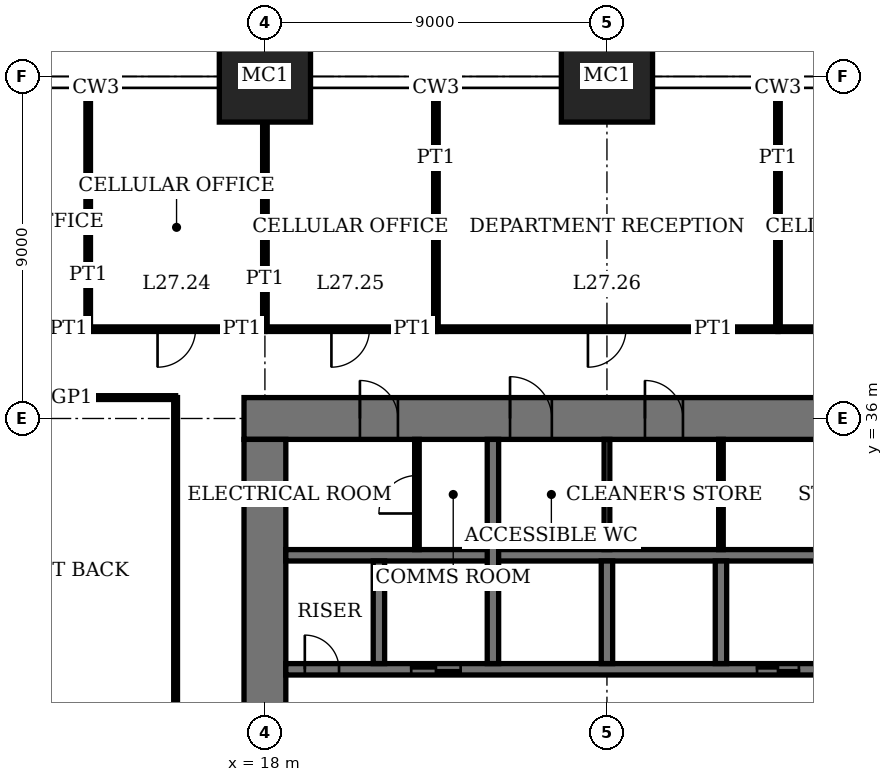
"""IFC4 building model, lengths in metres.
Left out: names, types, materials, properties, quantities, classifications, styles, units other than length and angle.
Written with IfcOpenShell. Run it as: python <this file> out.ifc"""

import sys

from ifc_helpers import new_model, si_unit, direction, frame, frame_2d, origin, origin_2d, place, context, subcontext, project, spatial, rectangle, extrude, element, fill, save


model = new_model("IFC4")
c1 = context("Model", 3, precision=1e-05, world=origin(), true_north=direction((0.0, 1.0)))
c2 = subcontext(c1, "Body", "Model", "MODEL_VIEW")
j1 = project(units=[si_unit("LENGTHUNIT", "METRE"), si_unit("PLANEANGLEUNIT", "RADIAN")], contexts=[c1])
p1 = place(None, origin())
s1 = spatial("IfcSite", under=j1, at=p1, CompositionType="ELEMENT")
p2 = place(p1, origin())
s2 = spatial("IfcBuilding", under=s1, at=p2, CompositionType="ELEMENT")
p3 = place(p2, frame((0.0, 0.0, 113.0)))
s3 = spatial("IfcBuildingStorey", under=s2, at=p3, CompositionType="ELEMENT", Elevation=113.0)
for number, where, z_axis, x_axis in (
    (1, (18.0, 45.0, 0.0), (0.0, 0.0, 1.0), (1.0, 0.0, 0.0)),
    (2, (27.0, 45.0, 0.0), (0.0, 0.0, 1.0), (1.0, 0.0, 0.0)),
):
    element("IfcColumn", number, at=place(p3, frame(where, z_axis=z_axis, x_axis=x_axis)), inside=s3, PredefinedType="COLUMN", context=c2, shape_type="SweptSolid", body=[
        extrude(rectangle(XDim=2.4, YDim=2.4, at=origin_2d()), origin(), (0.0, 0.0, 1.0), 4.0),
    ])
p4 = place(p3, frame((45.55, 36.0, 0.0), z_axis=(0.0, 0.0, 1.0), x_axis=(-1.0, 0.0, 0.0)))
e3 = element("IfcWall", 3, at=p4, inside=s3, PredefinedType="SHEAR", context=c2, shape_type="SweptSolid", body=[
    extrude(rectangle(XDim=28.1, YDim=1.1, at=frame_2d((14.05, 0.0))), origin(), (0.0, 0.0, 1.0), 4.0),
])
p5 = place(p4, frame((11.55, 0.0, 0.0)))
e4 = element("IfcOpeningElement", 4, at=p5, cuts=e3, PredefinedType="OPENING", context=c2, shape_type="SweptSolid", body=[
    extrude(rectangle(XDim=1.0, YDim=2.4, at=frame_2d((0.5, 1.2))), frame((0.0, 0.56, 0.0), z_axis=(0.0, -1.0, 0.0), x_axis=(1.0, 0.0, 0.0)), (0.0, 0.0, 1.0), 1.12),
])
p6 = place(p4, frame((16.55, 0.0, 0.0)))
e5 = element("IfcOpeningElement", 5, at=p6, cuts=e3, PredefinedType="OPENING", context=c2, shape_type="SweptSolid", body=[
    extrude(rectangle(XDim=1.0, YDim=2.4, at=frame_2d((0.5, 1.2))), frame((0.0, 0.56, 0.0), z_axis=(0.0, -1.0, 0.0), x_axis=(1.0, 0.0, 0.0)), (0.0, 0.0, 1.0), 1.12),
])
p7 = place(p4, frame((20.0, 0.0, 0.0)))
e6 = element("IfcOpeningElement", 6, at=p7, cuts=e3, PredefinedType="OPENING", context=c2, shape_type="SweptSolid", body=[
    extrude(rectangle(XDim=1.1, YDim=2.4, at=frame_2d((0.55, 1.2))), frame((0.0, 0.56, 0.0), z_axis=(0.0, -1.0, 0.0), x_axis=(1.0, 0.0, 0.0)), (0.0, 0.0, 1.0), 1.12),
])
p8 = place(p4, frame((24.05, 0.0, 0.0)))
e7 = element("IfcOpeningElement", 7, at=p8, cuts=e3, PredefinedType="OPENING", context=c2, shape_type="SweptSolid", body=[
    extrude(rectangle(XDim=1.0, YDim=2.4, at=frame_2d((0.5, 1.2))), frame((0.0, 0.56, 0.0), z_axis=(0.0, -1.0, 0.0), x_axis=(1.0, 0.0, 0.0)), (0.0, 0.0, 1.0), 1.12),
])
p9 = place(p3, frame((18.0, 35.45, 0.0), z_axis=(0.0, 0.0, 1.0), x_axis=(0.0, -1.0, 0.0)))
e8 = element("IfcWall", 8, at=p9, inside=s3, PredefinedType="SHEAR", context=c2, shape_type="SweptSolid", body=[
    extrude(rectangle(XDim=16.9, YDim=1.1, at=frame_2d((8.45, 0.0))), origin(), (0.0, 0.0, 1.0), 4.0),
])
p10 = place(p9, frame((8.45, 0.0, 0.0)))
e9 = element("IfcOpeningElement", 9, at=p10, cuts=e8, PredefinedType="OPENING", context=c2, shape_type="SweptSolid", body=[
    extrude(rectangle(XDim=1.8, YDim=2.4, at=frame_2d((0.9, 1.2))), frame((0.0, 0.56, 0.0), z_axis=(0.0, -1.0, 0.0), x_axis=(1.0, 0.0, 0.0)), (0.0, 0.0, 1.0), 1.12),
])
p11 = place(p3, frame((18.55, 29.4, 0.0), z_axis=(0.0, 0.0, 1.0), x_axis=(1.0, 0.0, 0.0)))
e10 = element("IfcWall", 10, at=p11, inside=s3, PredefinedType="SHEAR", context=c2, shape_type="SweptSolid", body=[
    extrude(rectangle(XDim=25.9, YDim=0.3, at=frame_2d((12.95, 0.0))), origin(), (0.0, 0.0, 1.0), 4.0),
])
p12 = place(p11, frame((19.95, 0.0, 0.0)))
e11 = element("IfcOpeningElement", 11, at=p12, cuts=e10, PredefinedType="OPENING", context=c2, shape_type="SweptSolid", body=[
    extrude(rectangle(XDim=1.0, YDim=2.4, at=frame_2d((0.5, 1.2))), frame((0.0, 0.16, 0.0), z_axis=(0.0, -1.0, 0.0), x_axis=(1.0, 0.0, 0.0)), (0.0, 0.0, 1.0), 0.32),
])
p13 = place(p11, frame((0.5, 0.0, 0.0)))
e12 = element("IfcOpeningElement", 12, at=p13, cuts=e10, PredefinedType="OPENING", context=c2, shape_type="SweptSolid", body=[
    extrude(rectangle(XDim=0.9, YDim=2.1, at=frame_2d((0.45, 1.05))), frame((0.0, 0.16, 0.0), z_axis=(0.0, -1.0, 0.0), x_axis=(1.0, 0.0, 0.0)), (0.0, 0.0, 1.0), 0.32),
])
p14 = place(p11, frame((15.4, 0.0, 0.0)))
e13 = element("IfcOpeningElement", 13, at=p14, cuts=e10, PredefinedType="OPENING", context=c2, shape_type="SweptSolid", body=[
    extrude(rectangle(XDim=1.1, YDim=2.4, at=frame_2d((0.55, 1.2))), frame((0.0, 0.16, 0.0), z_axis=(0.0, -1.0, 0.0), x_axis=(1.0, 0.0, 0.0)), (0.0, 0.0, 1.0), 0.32),
])
p15 = place(p11, frame((12.4, 0.0, 0.0)))
e14 = element("IfcOpeningElement", 14, at=p15, cuts=e10, PredefinedType="OPENING", context=c2, shape_type="SweptSolid", body=[
    extrude(rectangle(XDim=1.1, YDim=2.4, at=frame_2d((0.55, 1.2))), frame((0.0, 0.16, 0.0), z_axis=(0.0, -1.0, 0.0), x_axis=(1.0, 0.0, 0.0)), (0.0, 0.0, 1.0), 0.32),
])
p16 = place(p11, frame((3.3, 0.0, 0.0)))
e15 = element("IfcOpeningElement", 15, at=p16, cuts=e10, PredefinedType="OPENING", context=c2, shape_type="SweptSolid", body=[
    extrude(rectangle(XDim=1.3, YDim=2.4, at=frame_2d((0.65, 1.2))), frame((0.0, 0.16, 0.0), z_axis=(0.0, -1.0, 0.0), x_axis=(1.0, 0.0, 0.0)), (0.0, 0.0, 1.0), 0.32),
])
p17 = place(p3, frame((18.55, 32.4, 0.0), z_axis=(0.0, 0.0, 1.0), x_axis=(1.0, 0.0, 0.0)))
e16 = element("IfcWall", 16, at=p17, inside=s3, PredefinedType="SHEAR", context=c2, shape_type="SweptSolid", body=[
    extrude(rectangle(XDim=17.3, YDim=0.3, at=frame_2d((8.65, 0.0))), origin(), (0.0, 0.0, 1.0), 4.0),
])
for number, where, z_axis, x_axis in (
    (17, (30.0, 29.55, 0.0), (0.0, 0.0, 1.0), (0.0, 1.0, 0.0)),
    (18, (27.0, 29.55, 0.0), (0.0, 0.0, 1.0), (0.0, 1.0, 0.0)),
):
    element("IfcWall", number, at=place(p3, frame(where, z_axis=z_axis, x_axis=x_axis)), inside=s3, PredefinedType="SHEAR", context=c2, shape_type="SweptSolid", body=[
        extrude(rectangle(XDim=2.7, YDim=0.3, at=frame_2d((1.35, 0.0))), origin(), (0.0, 0.0, 1.0), 4.0),
    ])
p18 = place(p3, frame((24.0, 29.55, 0.0), z_axis=(0.0, 0.0, 1.0), x_axis=(0.0, 1.0, 0.0)))
e19 = element("IfcWall", 19, at=p18, inside=s3, PredefinedType="SHEAR", context=c2, shape_type="SweptSolid", body=[
    extrude(rectangle(XDim=5.9, YDim=0.3, at=frame_2d((2.95, 0.0))), origin(), (0.0, 0.0, 1.0), 4.0),
])
p19 = place(p3, frame((21.0, 29.55, 0.0), z_axis=(0.0, 0.0, 1.0), x_axis=(0.0, 1.0, 0.0)))
e20 = element("IfcWall", 20, at=p19, inside=s3, PredefinedType="SHEAR", context=c2, shape_type="SweptSolid", body=[
    extrude(rectangle(XDim=2.7, YDim=0.3, at=frame_2d((1.35, 0.0))), origin(), (0.0, 0.0, 1.0), 4.0),
])
p20 = place(p3, frame((10.0, 36.55, 0.0), z_axis=(0.0, 0.0, 1.0), x_axis=(1.0, 0.0, 0.0)))
e21 = element("IfcWall", 21, at=p20, inside=s3, PredefinedType="PARTITIONING", context=c2, shape_type="SweptSolid", body=[
    extrude(rectangle(XDim=5.65, YDim=0.1, at=frame_2d((2.825, 0.0))), origin(), (0.0, 0.0, 1.0), 3.75),
])
p21 = place(p3, frame((9.0, 38.35, 0.0), z_axis=(0.0, 0.0, 1.0), x_axis=(1.0, 0.0, 0.0)))
e22 = element("IfcWall", 22, at=p21, inside=s3, PredefinedType="PARTITIONING", context=c2, shape_type="SweptSolid", body=[
    extrude(rectangle(XDim=4.35, YDim=0.12, at=frame_2d((2.175, 0.0))), origin(), (0.0, 0.0, 1.0), 3.75),
])
p22 = place(p21, frame((1.675, 0.0, 0.0)))
e23 = element("IfcOpeningElement", 23, at=p22, cuts=e22, PredefinedType="OPENING", context=c2, shape_type="SweptSolid", body=[
    extrude(rectangle(XDim=1.0, YDim=2.4, at=frame_2d((0.5, 1.2))), frame((0.0, 0.07, 0.0), z_axis=(0.0, -1.0, 0.0), x_axis=(1.0, 0.0, 0.0)), (0.0, 0.0, 1.0), 0.14),
])
p23 = place(p3, frame((13.35, 38.35, 0.0), z_axis=(0.0, 0.0, 1.0), x_axis=(1.0, 0.0, 0.0)))
e24 = element("IfcWall", 24, at=p23, inside=s3, PredefinedType="PARTITIONING", context=c2, shape_type="SweptSolid", body=[
    extrude(rectangle(XDim=4.65, YDim=0.12, at=frame_2d((2.325, 0.0))), origin(), (0.0, 0.0, 1.0), 3.75),
])
p24 = place(p23, frame((1.825, 0.0, 0.0)))
e25 = element("IfcOpeningElement", 25, at=p24, cuts=e24, PredefinedType="OPENING", context=c2, shape_type="SweptSolid", body=[
    extrude(rectangle(XDim=1.0, YDim=2.4, at=frame_2d((0.5, 1.2))), frame((0.0, 0.07, 0.0), z_axis=(0.0, -1.0, 0.0), x_axis=(1.0, 0.0, 0.0)), (0.0, 0.0, 1.0), 0.14),
])
p25 = place(p3, frame((18.0, 38.35, 0.0), z_axis=(0.0, 0.0, 1.0), x_axis=(1.0, 0.0, 0.0)))
e26 = element("IfcWall", 26, at=p25, inside=s3, PredefinedType="PARTITIONING", context=c2, shape_type="SweptSolid", body=[
    extrude(rectangle(XDim=4.5, YDim=0.12, at=frame_2d((2.25, 0.0))), origin(), (0.0, 0.0, 1.0), 3.75),
])
p26 = place(p25, frame((1.75, 0.0, 0.0)))
e27 = element("IfcOpeningElement", 27, at=p26, cuts=e26, PredefinedType="OPENING", context=c2, shape_type="SweptSolid", body=[
    extrude(rectangle(XDim=1.0, YDim=2.4, at=frame_2d((0.5, 1.2))), frame((0.0, 0.07, 0.0), z_axis=(0.0, -1.0, 0.0), x_axis=(1.0, 0.0, 0.0)), (0.0, 0.0, 1.0), 0.14),
])
p27 = place(p3, frame((22.5, 38.35, 0.0), z_axis=(0.0, 0.0, 1.0), x_axis=(1.0, 0.0, 0.0)))
e28 = element("IfcWall", 28, at=p27, inside=s3, PredefinedType="PARTITIONING", context=c2, shape_type="SweptSolid", body=[
    extrude(rectangle(XDim=9.0, YDim=0.12, at=frame_2d((4.5, 0.0))), origin(), (0.0, 0.0, 1.0), 3.75),
])
p28 = place(p27, frame((4.0, 0.0, 0.0)))
e29 = element("IfcOpeningElement", 29, at=p28, cuts=e28, PredefinedType="OPENING", context=c2, shape_type="SweptSolid", body=[
    extrude(rectangle(XDim=1.0, YDim=2.4, at=frame_2d((0.5, 1.2))), frame((0.0, 0.07, 0.0), z_axis=(0.0, -1.0, 0.0), x_axis=(1.0, 0.0, 0.0)), (0.0, 0.0, 1.0), 0.14),
])
p29 = place(p3, frame((31.5, 38.35, 0.0), z_axis=(0.0, 0.0, 1.0), x_axis=(1.0, 0.0, 0.0)))
e30 = element("IfcWall", 30, at=p29, inside=s3, PredefinedType="PARTITIONING", context=c2, shape_type="SweptSolid", body=[
    extrude(rectangle(XDim=4.5, YDim=0.12, at=frame_2d((2.25, 0.0))), origin(), (0.0, 0.0, 1.0), 3.75),
])
p30 = place(p29, frame((1.75, 0.0, 0.0)))
e31 = element("IfcOpeningElement", 31, at=p30, cuts=e30, PredefinedType="OPENING", context=c2, shape_type="SweptSolid", body=[
    extrude(rectangle(XDim=1.0, YDim=2.4, at=frame_2d((0.5, 1.2))), frame((0.0, 0.07, 0.0), z_axis=(0.0, -1.0, 0.0), x_axis=(1.0, 0.0, 0.0)), (0.0, 0.0, 1.0), 0.14),
])
p31 = place(p3, frame((13.35, 38.35, 0.0), z_axis=(0.0, 0.0, 1.0), x_axis=(0.0, 1.0, 0.0)))
e32 = element("IfcWall", 32, at=p31, inside=s3, PredefinedType="PARTITIONING", context=c2, shape_type="SweptSolid", body=[
    extrude(rectangle(XDim=6.34, YDim=0.12, at=frame_2d((3.17, 0.0))), origin(), (0.0, 0.0, 1.0), 3.75),
])
p32 = place(p3, frame((15.65, 15.65, 0.0), z_axis=(0.0, 0.0, 1.0), x_axis=(0.0, 1.0, 0.0)))
e33 = element("IfcWall", 33, at=p32, inside=s3, PredefinedType="PARTITIONING", context=c2, shape_type="SweptSolid", body=[
    extrude(rectangle(XDim=20.9, YDim=0.1, at=frame_2d((10.45, 0.0))), origin(), (0.0, 0.0, 1.0), 3.75),
])
p33 = place(p32, frame((9.95, 0.0, 0.0)))
e34 = element("IfcOpeningElement", 34, at=p33, cuts=e33, PredefinedType="OPENING", context=c2, shape_type="SweptSolid", body=[
    extrude(rectangle(XDim=1.0, YDim=2.4, at=frame_2d((0.5, 1.2))), frame((0.0, 0.06, 0.0), z_axis=(0.0, -1.0, 0.0), x_axis=(1.0, 0.0, 0.0)), (0.0, 0.0, 1.0), 0.12),
])
p34 = place(p3, frame((18.0, 38.35, 0.0), z_axis=(0.0, 0.0, 1.0), x_axis=(0.0, 1.0, 0.0)))
e35 = element("IfcWall", 35, at=p34, inside=s3, PredefinedType="PARTITIONING", context=c2, shape_type="SweptSolid", body=[
    extrude(rectangle(XDim=5.45, YDim=0.12, at=frame_2d((2.725, 0.0))), origin(), (0.0, 0.0, 1.0), 3.05),
])
for number, where, z_axis, x_axis in (
    (36, (22.5, 38.35, 0.0), (0.0, 0.0, 1.0), (0.0, 1.0, 0.0)),
    (37, (31.5, 38.35, 0.0), (0.0, 0.0, 1.0), (0.0, 1.0, 0.0)),
):
    element("IfcWall", number, at=place(p3, frame(where, z_axis=z_axis, x_axis=x_axis)), inside=s3, PredefinedType="PARTITIONING", context=c2, shape_type="SweptSolid", body=[
        extrude(rectangle(XDim=6.34, YDim=0.12, at=frame_2d((3.17, 0.0))), origin(), (0.0, 0.0, 1.0), 3.75),
    ])
p35 = place(p3, frame((30.0, 32.55, 0.0), z_axis=(0.0, 0.0, 1.0), x_axis=(0.0, 1.0, 0.0)))
e38 = element("IfcWall", 38, at=p35, inside=s3, PredefinedType="PARTITIONING", context=c2, shape_type="SweptSolid", body=[
    extrude(rectangle(XDim=2.9, YDim=0.12, at=frame_2d((1.45, 0.0))), origin(), (0.0, 0.0, 1.0), 3.75),
])
p36 = place(p3, frame((27.0, 32.55, 0.0), z_axis=(0.0, 0.0, 1.0), x_axis=(0.0, 1.0, 0.0)))
e39 = element("IfcWall", 39, at=p36, inside=s3, PredefinedType="PARTITIONING", context=c2, shape_type="SweptSolid", body=[
    extrude(rectangle(XDim=2.9, YDim=0.15, at=frame_2d((1.45, 0.0))), origin(), (0.0, 0.0, 1.0), 3.75),
])
p37 = place(p3, frame((22.0, 32.55, 0.0), z_axis=(0.0, 0.0, 1.0), x_axis=(0.0, 1.0, 0.0)))
e40 = element("IfcWall", 40, at=p37, inside=s3, PredefinedType="PARTITIONING", context=c2, shape_type="SweptSolid", body=[
    extrude(rectangle(XDim=2.9, YDim=0.12, at=frame_2d((1.45, 0.0))), origin(), (0.0, 0.0, 1.0), 3.75),
])
p38 = place(p37, frame((0.95, 0.0, 0.0)))
e41 = element("IfcOpeningElement", 41, at=p38, cuts=e40, PredefinedType="OPENING", context=c2, shape_type="SweptSolid", body=[
    extrude(rectangle(XDim=1.0, YDim=2.4, at=frame_2d((0.5, 1.2))), frame((0.0, 0.07, 0.0), z_axis=(0.0, -1.0, 0.0), x_axis=(1.0, 0.0, 0.0)), (0.0, 0.0, 1.0), 0.14),
])
p39 = place(p6, origin())
e42 = element("IfcDoor", 42, at=p39, inside=s3, OperationType="SINGLE_SWING_RIGHT", PredefinedType="DOOR", context=c2, shape_type="SweptSolid", body=[
    extrude(rectangle(XDim=1.0, YDim=2.4, at=frame_2d((0.5, 1.2))), frame((0.0, 0.025, 0.0), z_axis=(0.0, -1.0, 0.0), x_axis=(1.0, 0.0, 0.0)), (0.0, 0.0, 1.0), 0.05),
    extrude(rectangle(XDim=0.04, YDim=2.4, at=frame_2d((0.02, 1.2))), frame((0.0, 0.4, 0.0), z_axis=(0.0, -1.0, 0.0), x_axis=(1.0, 0.0, 0.0)), (0.0, 0.0, 1.0), 0.8),
    extrude(rectangle(XDim=0.04, YDim=2.4, at=frame_2d((0.98, 1.2))), frame((0.0, 0.4, 0.0), z_axis=(0.0, -1.0, 0.0), x_axis=(1.0, 0.0, 0.0)), (0.0, 0.0, 1.0), 0.8),
    extrude(rectangle(XDim=1.0, YDim=0.04, at=frame_2d((0.5, 2.38))), frame((0.0, 0.4, 0.0), z_axis=(0.0, -1.0, 0.0), x_axis=(1.0, 0.0, 0.0)), (0.0, 0.0, 1.0), 0.8),
])
fill(e5, e42)
p40 = place(p7, origin())
e43 = element("IfcDoor", 43, at=p40, inside=s3, OperationType="SINGLE_SWING_RIGHT", PredefinedType="DOOR", context=c2, shape_type="SweptSolid", body=[
    extrude(rectangle(XDim=1.1, YDim=2.4, at=frame_2d((0.55, 1.2))), frame((0.0, 0.025, 0.0), z_axis=(0.0, -1.0, 0.0), x_axis=(1.0, 0.0, 0.0)), (0.0, 0.0, 1.0), 0.05),
    extrude(rectangle(XDim=0.04, YDim=2.4, at=frame_2d((0.02, 1.2))), frame((0.0, 0.44, 0.0), z_axis=(0.0, -1.0, 0.0), x_axis=(1.0, 0.0, 0.0)), (0.0, 0.0, 1.0), 0.88),
    extrude(rectangle(XDim=0.04, YDim=2.4, at=frame_2d((1.08, 1.2))), frame((0.0, 0.44, 0.0), z_axis=(0.0, -1.0, 0.0), x_axis=(1.0, 0.0, 0.0)), (0.0, 0.0, 1.0), 0.88),
    extrude(rectangle(XDim=1.1, YDim=0.04, at=frame_2d((0.55, 2.38))), frame((0.0, 0.44, 0.0), z_axis=(0.0, -1.0, 0.0), x_axis=(1.0, 0.0, 0.0)), (0.0, 0.0, 1.0), 0.88),
])
fill(e6, e43)
p41 = place(p8, origin())
e44 = element("IfcDoor", 44, at=p41, inside=s3, OperationType="SINGLE_SWING_RIGHT", PredefinedType="DOOR", context=c2, shape_type="SweptSolid", body=[
    extrude(rectangle(XDim=1.0, YDim=2.4, at=frame_2d((0.5, 1.2))), frame((0.0, 0.025, 0.0), z_axis=(0.0, -1.0, 0.0), x_axis=(1.0, 0.0, 0.0)), (0.0, 0.0, 1.0), 0.05),
    extrude(rectangle(XDim=0.04, YDim=2.4, at=frame_2d((0.02, 1.2))), frame((0.0, 0.4, 0.0), z_axis=(0.0, -1.0, 0.0), x_axis=(1.0, 0.0, 0.0)), (0.0, 0.0, 1.0), 0.8),
    extrude(rectangle(XDim=0.04, YDim=2.4, at=frame_2d((0.98, 1.2))), frame((0.0, 0.4, 0.0), z_axis=(0.0, -1.0, 0.0), x_axis=(1.0, 0.0, 0.0)), (0.0, 0.0, 1.0), 0.8),
    extrude(rectangle(XDim=1.0, YDim=0.04, at=frame_2d((0.5, 2.38))), frame((0.0, 0.4, 0.0), z_axis=(0.0, -1.0, 0.0), x_axis=(1.0, 0.0, 0.0)), (0.0, 0.0, 1.0), 0.8),
])
fill(e7, e44)
p42 = place(p13, origin())
e45 = element("IfcDoor", 45, at=p42, inside=s3, OperationType="SINGLE_SWING_RIGHT", PredefinedType="DOOR", context=c2, shape_type="SweptSolid", body=[
    extrude(rectangle(XDim=0.9, YDim=2.1, at=frame_2d((0.45, 1.05))), frame((0.0, 0.03, 0.0), z_axis=(0.0, -1.0, 0.0), x_axis=(1.0, 0.0, 0.0)), (0.0, 0.0, 1.0), 0.06),
])
fill(e12, e45)
p43 = place(p24, origin())
e46 = element("IfcDoor", 46, at=p43, inside=s3, OperationType="SINGLE_SWING_LEFT", PredefinedType="DOOR", context=c2, shape_type="SweptSolid", body=[
    extrude(rectangle(XDim=1.0, YDim=2.4, at=frame_2d((0.5, 1.2))), frame((0.0, 0.025, 0.0), z_axis=(0.0, -1.0, 0.0), x_axis=(1.0, 0.0, 0.0)), (0.0, 0.0, 1.0), 0.05),
])
fill(e25, e46)
p44 = place(p26, origin())
e47 = element("IfcDoor", 47, at=p44, inside=s3, OperationType="SINGLE_SWING_LEFT", PredefinedType="DOOR", context=c2, shape_type="SweptSolid", body=[
    extrude(rectangle(XDim=1.0, YDim=2.4, at=frame_2d((0.5, 1.2))), frame((0.0, 0.025, 0.0), z_axis=(0.0, -1.0, 0.0), x_axis=(1.0, 0.0, 0.0)), (0.0, 0.0, 1.0), 0.05),
])
fill(e27, e47)
p45 = place(p28, origin())
e48 = element("IfcDoor", 48, at=p45, inside=s3, OperationType="SINGLE_SWING_LEFT", PredefinedType="DOOR", context=c2, shape_type="SweptSolid", body=[
    extrude(rectangle(XDim=1.0, YDim=2.4, at=frame_2d((0.5, 1.2))), frame((0.0, 0.025, 0.0), z_axis=(0.0, -1.0, 0.0), x_axis=(1.0, 0.0, 0.0)), (0.0, 0.0, 1.0), 0.05),
])
fill(e29, e48)
p46 = place(p38, origin())
e49 = element("IfcDoor", 49, at=p46, inside=s3, OperationType="SINGLE_SWING_RIGHT", PredefinedType="DOOR", context=c2, shape_type="SweptSolid", body=[
    extrude(rectangle(XDim=1.0, YDim=2.4, at=frame_2d((0.5, 1.2))), frame((0.0, 0.03, 0.0), z_axis=(0.0, -1.0, 0.0), x_axis=(1.0, 0.0, 0.0)), (0.0, 0.0, 1.0), 0.06),
])
fill(e41, e49)
p47 = place(p15, origin())
e50 = element("IfcDoor", 50, at=p47, inside=s3, OperationType="DOUBLE_DOOR_SLIDING", PredefinedType="DOOR", context=c2, shape_type="SweptSolid", body=[
    extrude(rectangle(XDim=1.1, YDim=2.4, at=frame_2d((0.55, 1.2))), frame((0.0, 0.02, 0.0), z_axis=(0.0, -1.0, 0.0), x_axis=(1.0, 0.0, 0.0)), (0.0, 0.0, 1.0), 0.04),
])
fill(e14, e50)
p48 = place(p16, origin())
e51 = element("IfcDoor", 51, at=p48, inside=s3, OperationType="DOUBLE_DOOR_SLIDING", PredefinedType="DOOR", context=c2, shape_type="SweptSolid", body=[
    extrude(rectangle(XDim=1.3, YDim=2.4, at=frame_2d((0.65, 1.2))), frame((0.0, 0.02, 0.0), z_axis=(0.0, -1.0, 0.0), x_axis=(1.0, 0.0, 0.0)), (0.0, 0.0, 1.0), 0.04),
])
fill(e15, e51)
save(model, sys.argv[1])
